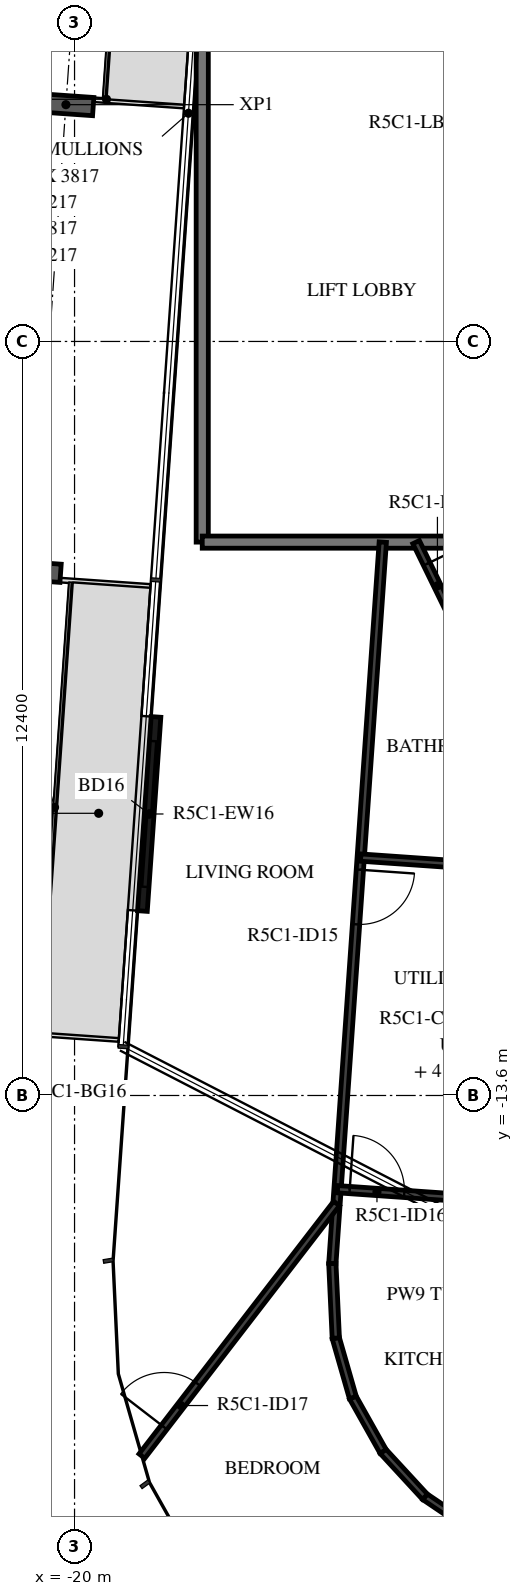
"""IFC4 building model, lengths in metres.
Left out: names, types, materials, properties, quantities, classifications, styles, units other than length and angle.
Written with IfcOpenShell. Run it as: python <this file> out.ifc"""

import sys

from ifc_helpers import new_model, si_unit, direction, frame, frame_2d, origin, origin_2d, place, context, subcontext, project, spatial, rectangle, i_section, extrude, element, fill, save


model = new_model("IFC4")
c1 = context("Model", 3, precision=1e-05, world=origin(), true_north=direction((0.0, 1.0)))
c2 = subcontext(c1, "Body", "Model", "MODEL_VIEW")
j1 = project(units=[si_unit("LENGTHUNIT", "METRE"), si_unit("PLANEANGLEUNIT", "RADIAN")], contexts=[c1])
p1 = place(None, origin())
s1 = spatial("IfcSite", under=j1, at=p1, CompositionType="ELEMENT")
p2 = place(p1, origin())
s2 = spatial("IfcBuilding", under=s1, at=p2, CompositionType="ELEMENT")
p3 = place(p2, frame((0.0, 0.0, 212.9)))
s3 = spatial("IfcBuildingStorey", under=s2, at=p3, CompositionType="ELEMENT", Elevation=212.9)
for number, where, z_axis, x_axis in (
    (1, (-20.142, 2.694, -0.38), (0.0, 0.0, 1.0), (0.07, 0.998, 0.0)),
    (2, (-20.679, -4.981, -0.38), (0.0, 0.0, 1.0), (0.07, 0.998, 0.0)),
):
    element("IfcColumn", number, at=place(p3, frame(where, z_axis=z_axis, x_axis=x_axis)), inside=s3, PredefinedType="COLUMN", context=c2, shape_type="SweptSolid", body=[
        extrude(i_section(OverallWidth=0.3, OverallDepth=0.9, WebThickness=0.019, FlangeThickness=0.035, FilletRadius=0.03, at=origin_2d()), origin(), (0.0, 0.0, 1.0), 3.5),
    ])
p4 = place(p3, frame((-18.661, -7.375, 0.0), z_axis=(0.0, 0.0, 1.0), x_axis=(-0.069734222855, -0.997565605944, 0.0)))
e3 = element("IfcWall", 3, at=p4, inside=s3, PredefinedType="STANDARD", context=c2, shape_type="SweptSolid", body=[
    extrude(rectangle(XDim=3.2, YDim=0.16, at=frame_2d((1.6, 0.0))), origin(), (0.0, 0.0, 1.0), 3.12),
])
p5 = place(p4, frame((0.4, 0.0, 0.0)))
e4 = element("IfcOpeningElement", 4, at=p5, cuts=e3, PredefinedType="OPENING", context=c2, shape_type="SweptSolid", body=[
    extrude(rectangle(XDim=2.4, YDim=2.4, at=frame_2d((1.2, 1.2))), frame((0.0, 0.09, 0.0), z_axis=(0.0, -1.0, 0.0), x_axis=(1.0, 0.0, 0.0)), (0.0, 0.0, 1.0), 0.18),
])
p6 = place(p3, frame((-17.9, 4.5, 0.0), z_axis=(0.0, 0.0, 1.0), x_axis=(0.0, -1.0, 0.0)))
e5 = element("IfcWall", 5, at=p6, inside=s3, PredefinedType="STANDARD", context=c2, shape_type="SweptSolid", body=[
    extrude(rectangle(XDim=9.0, YDim=0.2, at=frame_2d((4.5, 0.0))), origin(), (0.0, 0.0, 1.0), 3.12),
])
p7 = place(p3, frame((-17.9, -4.5, 0.0), z_axis=(0.0, 0.0, 1.0), x_axis=(1.0, 0.0, 0.0)))
e6 = element("IfcWall", 6, at=p7, inside=s3, PredefinedType="STANDARD", context=c2, shape_type="SweptSolid", body=[
    extrude(rectangle(XDim=6.789, YDim=0.2, at=frame_2d((3.394, 0.0))), origin(), (0.0, 0.0, 1.0), 3.12),
])
p8 = place(p3, frame((-14.979, -24.017, 0.0), z_axis=(0.0, 0.0, 1.0), x_axis=(0.449732900329, 0.89316309729, 0.0)))
e7 = element("IfcWall", 7, at=p8, inside=s3, PredefinedType="STANDARD", context=c2, shape_type="SweptSolid", body=[
    extrude(rectangle(XDim=5.229, YDim=0.2, at=frame_2d((2.615, 0.0))), origin(), (0.0, 0.0, 1.0), 2.73),
])
p9 = place(p3, frame((-14.383, -4.5, 0.0), z_axis=(0.0, 0.0, 1.0), x_axis=(0.438393414895, -0.898783185077, 0.0)))
e8 = element("IfcWall", 8, at=p9, inside=s3, PredefinedType="PARTITIONING", context=c2, shape_type="SweptSolid", body=[
    extrude(rectangle(XDim=6.049, YDim=0.12, at=frame_2d((3.024, 0.0))), origin(), (0.0, 0.0, 1.0), 3.12),
])
p10 = place(p9, frame((0.4, 0.0, 0.0)))
e9 = element("IfcOpeningElement", 9, at=p10, cuts=e8, PredefinedType="OPENING", context=c2, shape_type="SweptSolid", body=[
    extrude(rectangle(XDim=0.8, YDim=2.1, at=frame_2d((0.4, 1.05))), frame((0.0, 0.07, 0.0), z_axis=(0.0, -1.0, 0.0), x_axis=(1.0, 0.0, 0.0)), (0.0, 0.0, 1.0), 0.14),
])
p11 = place(p3, frame((-14.931, -4.5, 0.0), z_axis=(0.0, 0.0, 1.0), x_axis=(-0.069751708439, -0.997564383471, 0.0)))
e10 = element("IfcWall", 10, at=p11, inside=s3, PredefinedType="PARTITIONING", context=c2, shape_type="SweptSolid", body=[
    extrude(rectangle(XDim=11.894, YDim=0.12, at=frame_2d((5.947, 0.0))), origin(), (0.0, 0.0, 1.0), 3.12),
])
p12 = place(p11, frame((5.4, 0.0, 0.0)))
e11 = element("IfcOpeningElement", 11, at=p12, cuts=e10, PredefinedType="OPENING", context=c2, shape_type="SweptSolid", body=[
    extrude(rectangle(XDim=0.9, YDim=2.1, at=frame_2d((0.45, 1.05))), frame((0.0, 0.07, 0.0), z_axis=(0.0, -1.0, 0.0), x_axis=(1.0, 0.0, 0.0)), (0.0, 0.0, 1.0), 0.14),
])
p13 = place(p3, frame((-15.294, -9.688, 0.0), z_axis=(0.0, 0.0, 1.0), x_axis=(0.997565819809, -0.069731163391, 0.0)))
e12 = element("IfcWall", 12, at=p13, inside=s3, PredefinedType="PARTITIONING", context=c2, shape_type="SweptSolid", body=[
    extrude(rectangle(XDim=3.571, YDim=0.12, at=frame_2d((1.786, 0.0))), origin(), (0.0, 0.0, 1.0), 3.12),
])
p14 = place(p3, frame((-18.892, -19.531, 0.0), z_axis=(0.0, 0.0, 1.0), x_axis=(0.610347240441, 0.792133982408, 0.0)))
e13 = element("IfcWall", 13, at=p14, inside=s3, PredefinedType="PARTITIONING", context=c2, shape_type="SweptSolid", body=[
    extrude(rectangle(XDim=5.244, YDim=0.12, at=frame_2d((2.622, 0.0))), origin(), (0.0, 0.0, 1.0), 3.12),
])
p15 = place(p14, frame((0.6, 0.0, 0.0)))
e14 = element("IfcOpeningElement", 14, at=p15, cuts=e13, PredefinedType="OPENING", context=c2, shape_type="SweptSolid", body=[
    extrude(rectangle(XDim=0.9, YDim=2.1, at=frame_2d((0.45, 1.05))), frame((0.0, 0.07, 0.0), z_axis=(0.0, -1.0, 0.0), x_axis=(1.0, 0.0, 0.0)), (0.0, 0.0, 1.0), 0.14),
])
p16 = place(p3, frame((-15.675, -15.141, 0.0), z_axis=(0.0, 0.0, 1.0), x_axis=(0.997563107735, -0.06976995117, 0.0)))
e15 = element("IfcWall", 15, at=p16, inside=s3, PredefinedType="PARTITIONING", context=c2, shape_type="SweptSolid", body=[
    extrude(rectangle(XDim=4.146, YDim=0.12, at=frame_2d((2.073, 0.0))), origin(), (0.0, 0.0, 1.0), 3.12),
])
p17 = place(p16, frame((0.2, 0.0, 0.0)))
e16 = element("IfcOpeningElement", 16, at=p17, cuts=e15, PredefinedType="OPENING", context=c2, shape_type="SweptSolid", body=[
    extrude(rectangle(XDim=0.9, YDim=2.1, at=frame_2d((0.45, 1.05))), frame((0.0, 0.07, 0.0), z_axis=(0.0, -1.0, 0.0), x_axis=(1.0, 0.0, 0.0)), (0.0, 0.0, 1.0), 0.14),
])
for number, where, z_axis, x_axis in (
    (17, (-13.395, -20.767, 0.0), (0.0, 0.0, 1.0), (-0.829, 0.559, 0.0)),
    (18, (-14.237, -20.199, 0.0), (0.0, 0.0, 1.0), (-0.678, 0.735, 0.0)),
):
    element("IfcWall", number, at=place(p3, frame(where, z_axis=z_axis, x_axis=x_axis)), inside=s3, PredefinedType="PARTITIONING", context=c2, shape_type="SweptSolid", body=[
        extrude(rectangle(XDim=1.016, YDim=0.12, at=frame_2d((0.508, 0.0))), origin(), (0.0, 0.0, 1.0), 3.12),
    ])
p18 = place(p3, frame((-14.926, -19.452, 0.0), z_axis=(0.0, 0.0, 1.0), x_axis=(-0.489941776958, 0.871755157823, 0.0)))
e19 = element("IfcWall", 19, at=p18, inside=s3, PredefinedType="PARTITIONING", context=c2, shape_type="SweptSolid", body=[
    extrude(rectangle(XDim=1.016, YDim=0.12, at=frame_2d((0.508, 0.0))), origin(), (0.0, 0.0, 1.0), 3.12),
])
p19 = place(p3, frame((-15.424, -18.567, 0.0), z_axis=(0.0, 0.0, 1.0), x_axis=(-0.275641454312, 0.961260520704, 0.0)))
e20 = element("IfcWall", 20, at=p19, inside=s3, PredefinedType="PARTITIONING", context=c2, shape_type="SweptSolid", body=[
    extrude(rectangle(XDim=1.016, YDim=0.12, at=frame_2d((0.508, 0.0))), origin(), (0.0, 0.0, 1.0), 3.12),
])
p20 = place(p3, frame((-15.704, -17.59, 0.0), z_axis=(0.0, 0.0, 1.0), x_axis=(-0.046364428258, 0.998924591645, 0.0)))
e21 = element("IfcWall", 21, at=p20, inside=s3, PredefinedType="PARTITIONING", context=c2, shape_type="SweptSolid", body=[
    extrude(rectangle(XDim=1.227, YDim=0.12, at=frame_2d((0.613, 0.0))), origin(), (0.0, 0.0, 1.0), 3.12),
])
p21 = place(p5, origin())
e22 = element("IfcDoor", 22, at=p21, inside=s3, OperationType="DOUBLE_DOOR_SLIDING", PredefinedType="DOOR", context=c2, shape_type="SweptSolid", body=[
    extrude(rectangle(XDim=2.4, YDim=2.4, at=frame_2d((1.2, 1.2))), frame((0.0, 0.025, 0.0), z_axis=(0.0, -1.0, 0.0), x_axis=(1.0, 0.0, 0.0)), (0.0, 0.0, 1.0), 0.05),
])
fill(e4, e22)
p22 = place(p10, origin())
e23 = element("IfcDoor", 23, at=p22, inside=s3, OperationType="SINGLE_SWING_RIGHT", PredefinedType="DOOR", context=c2, shape_type="SweptSolid", body=[
    extrude(rectangle(XDim=0.8, YDim=2.1, at=frame_2d((0.4, 1.05))), frame((0.0, 0.025, 0.0), z_axis=(0.0, -1.0, 0.0), x_axis=(1.0, 0.0, 0.0)), (0.0, 0.0, 1.0), 0.05),
])
fill(e9, e23)
p23 = place(p12, origin())
e24 = element("IfcDoor", 24, at=p23, inside=s3, OperationType="SINGLE_SWING_RIGHT", PredefinedType="DOOR", context=c2, shape_type="SweptSolid", body=[
    extrude(rectangle(XDim=0.9, YDim=2.1, at=frame_2d((0.45, 1.05))), frame((0.0, 0.025, 0.0), z_axis=(0.0, -1.0, 0.0), x_axis=(1.0, 0.0, 0.0)), (0.0, 0.0, 1.0), 0.05),
])
fill(e11, e24)
p24 = place(p17, origin())
e25 = element("IfcDoor", 25, at=p24, inside=s3, OperationType="SINGLE_SWING_RIGHT", PredefinedType="DOOR", context=c2, shape_type="SweptSolid", body=[
    extrude(rectangle(XDim=0.9, YDim=2.1, at=frame_2d((0.45, 1.05))), frame((0.0, 0.025, 0.0), z_axis=(0.0, -1.0, 0.0), x_axis=(1.0, 0.0, 0.0)), (0.0, 0.0, 1.0), 0.05),
])
fill(e16, e25)
p25 = place(p15, origin())
e26 = element("IfcDoor", 26, at=p25, inside=s3, OperationType="SINGLE_SWING_RIGHT", PredefinedType="DOOR", context=c2, shape_type="SweptSolid", body=[
    extrude(rectangle(XDim=0.9, YDim=2.1, at=frame_2d((0.45, 1.05))), frame((0.0, 0.025, 0.0), z_axis=(0.0, -1.0, 0.0), x_axis=(1.0, 0.0, 0.0)), (0.0, 0.0, 1.0), 0.05),
])
fill(e14, e26)
save(model, sys.argv[1])
